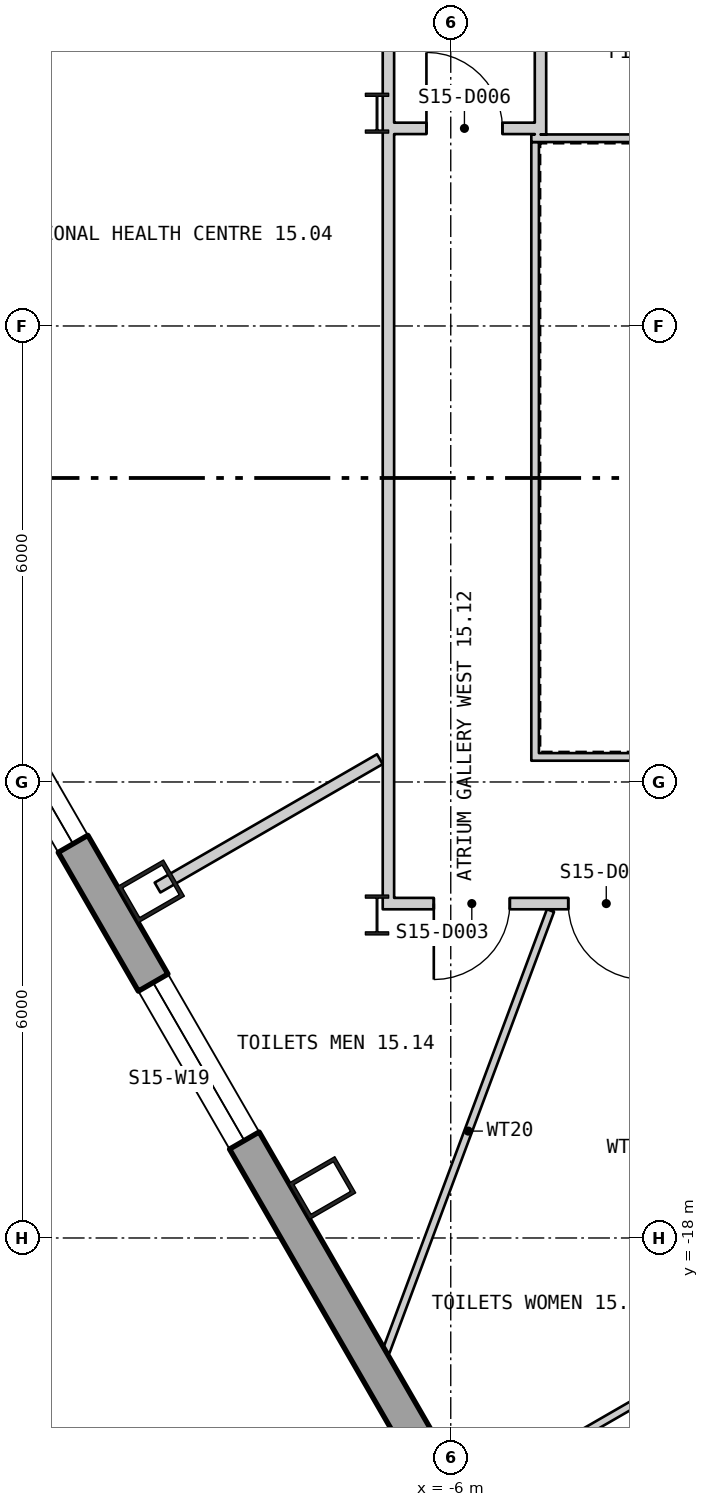
"""IFC4 building model, lengths in metres.
Left out: names, types, materials, properties, quantities, classifications, styles, units other than length and angle.
Written with IfcOpenShell. Run it as: python <this file> out.ifc"""

import sys

from ifc_helpers import new_model, si_unit, direction, frame, frame_2d, origin, origin_2d, place, context, subcontext, project, spatial, polyline, rectangle, hollow_rectangle, i_section, outline, extrude, element, fill, save


model = new_model("IFC4")
c1 = context("Model", 3, precision=1e-05, world=origin(), true_north=direction((0.0, 1.0)))
c2 = subcontext(c1, "Body", "Model", "MODEL_VIEW")
j1 = project(units=[si_unit("LENGTHUNIT", "METRE"), si_unit("PLANEANGLEUNIT", "RADIAN")], contexts=[c1])
p1 = place(None, origin())
s1 = spatial("IfcSite", under=j1, at=p1, CompositionType="ELEMENT")
p2 = place(p1, origin())
s2 = spatial("IfcBuilding", under=s1, at=p2, CompositionType="ELEMENT")
p3 = place(p2, frame((0.0, 0.0, 204.3)))
s3 = spatial("IfcBuildingStorey", under=s2, at=p3, CompositionType="ELEMENT", Elevation=204.3)
for number, where, z_axis, x_axis in (
    (1, (-9.945, -13.439, 0.0), (0.0, 0.0, 1.0), (0.5, -0.866, 0.0)),
    (2, (-7.691, -17.343, 0.0), (0.0, 0.0, 1.0), (0.5, -0.866, 0.0)),
):
    element("IfcColumn", number, at=place(p3, frame(where, z_axis=z_axis, x_axis=x_axis)), inside=s3, PredefinedType="COLUMN", context=c2, shape_type="SweptSolid", body=[
        extrude(hollow_rectangle(XDim=0.55, YDim=0.7, WallThickness=0.05, at=origin_2d()), origin(), (0.0, 0.0, 1.0), 3.9),
    ])
for number, where, z_axis, x_axis in (
    (3, (-6.97, -3.2, 0.0), (0.0, 0.0, 1.0), (1.0, 0.0, 0.0)),
    (4, (-6.97, -13.75, 0.0), (0.0, 0.0, 1.0), (1.0, 0.0, 0.0)),
):
    element("IfcColumn", number, at=place(p3, frame(where, z_axis=z_axis, x_axis=x_axis)), inside=s3, PredefinedType="COLUMN", context=c2, shape_type="SweptSolid", body=[
        extrude(i_section(OverallWidth=0.306, OverallDepth=0.524, WebThickness=0.021, FlangeThickness=0.04, at=origin_2d()), origin(), (0.0, 0.0, 1.0), 3.9),
    ])
p4 = place(p3, frame((-26.385, 13.887, -0.18), z_axis=(0.0, 0.0, 1.0), x_axis=(0.499999764979, -0.866025539474, 0.0)))
e5 = element("IfcWall", 5, at=p4, inside=s3, PredefinedType="SOLIDWALL", context=c2, shape_type="SweptSolid", body=[
    extrude(outline(polyline([(-0.13, -0.225), (45.87, -0.225), (45.61, 0.225), (0.13, 0.225), (-0.13, -0.225)])), origin(), (0.0, 0.0, 1.0), 3.68),
])
p5 = place(p4, frame((1.424, 0.0, 1.08)))
e6 = element("IfcOpeningElement", 6, at=p5, cuts=e5, PredefinedType="OPENING", context=c2, shape_type="SweptSolid", body=[
    extrude(rectangle(XDim=2.4, YDim=2.0, at=frame_2d((1.2, 1.0))), frame((0.0, 0.235, 0.0), z_axis=(0.0, -1.0, 0.0), x_axis=(1.0, 0.0, 0.0)), (0.0, 0.0, 1.0), 0.47),
])
p6 = place(p4, frame((5.893, 0.0, 1.08)))
e7 = element("IfcOpeningElement", 7, at=p6, cuts=e5, PredefinedType="OPENING", context=c2, shape_type="SweptSolid", body=[
    extrude(rectangle(XDim=2.4, YDim=2.0, at=frame_2d((1.2, 1.0))), frame((0.0, 0.235, 0.0), z_axis=(0.0, -1.0, 0.0), x_axis=(1.0, 0.0, 0.0)), (0.0, 0.0, 1.0), 0.47),
])
p7 = place(p4, frame((10.401, 0.0, 1.08)))
e8 = element("IfcOpeningElement", 8, at=p7, cuts=e5, PredefinedType="OPENING", context=c2, shape_type="SweptSolid", body=[
    extrude(rectangle(XDim=2.4, YDim=2.0, at=frame_2d((1.2, 1.0))), frame((0.0, 0.235, 0.0), z_axis=(0.0, -1.0, 0.0), x_axis=(1.0, 0.0, 0.0)), (0.0, 0.0, 1.0), 0.47),
])
p8 = place(p4, frame((14.909, 0.0, 1.08)))
e9 = element("IfcOpeningElement", 9, at=p8, cuts=e5, PredefinedType="OPENING", context=c2, shape_type="SweptSolid", body=[
    extrude(rectangle(XDim=2.4, YDim=2.0, at=frame_2d((1.2, 1.0))), frame((0.0, 0.235, 0.0), z_axis=(0.0, -1.0, 0.0), x_axis=(1.0, 0.0, 0.0)), (0.0, 0.0, 1.0), 0.47),
])
p9 = place(p4, frame((19.416, 0.0, 1.08)))
e10 = element("IfcOpeningElement", 10, at=p9, cuts=e5, PredefinedType="OPENING", context=c2, shape_type="SweptSolid", body=[
    extrude(rectangle(XDim=2.4, YDim=2.0, at=frame_2d((1.2, 1.0))), frame((0.0, 0.235, 0.0), z_axis=(0.0, -1.0, 0.0), x_axis=(1.0, 0.0, 0.0)), (0.0, 0.0, 1.0), 0.47),
])
p10 = place(p4, frame((23.924, 0.0, 1.08)))
e11 = element("IfcOpeningElement", 11, at=p10, cuts=e5, PredefinedType="OPENING", context=c2, shape_type="SweptSolid", body=[
    extrude(rectangle(XDim=2.4, YDim=2.0, at=frame_2d((1.2, 1.0))), frame((0.0, 0.235, 0.0), z_axis=(0.0, -1.0, 0.0), x_axis=(1.0, 0.0, 0.0)), (0.0, 0.0, 1.0), 0.47),
])
p11 = place(p4, frame((28.431, 0.0, 1.08)))
e12 = element("IfcOpeningElement", 12, at=p11, cuts=e5, PredefinedType="OPENING", context=c2, shape_type="SweptSolid", body=[
    extrude(rectangle(XDim=2.4, YDim=2.0, at=frame_2d((1.2, 1.0))), frame((0.0, 0.235, 0.0), z_axis=(0.0, -1.0, 0.0), x_axis=(1.0, 0.0, 0.0)), (0.0, 0.0, 1.0), 0.47),
])
p12 = place(p4, frame((32.939, 0.0, 1.08)))
e13 = element("IfcOpeningElement", 13, at=p12, cuts=e5, PredefinedType="OPENING", context=c2, shape_type="SweptSolid", body=[
    extrude(rectangle(XDim=2.4, YDim=2.0, at=frame_2d((1.2, 1.0))), frame((0.0, 0.235, 0.0), z_axis=(0.0, -1.0, 0.0), x_axis=(1.0, 0.0, 0.0)), (0.0, 0.0, 1.0), 0.47),
])
p13 = place(p4, frame((41.916, 0.0, 1.08)))
e14 = element("IfcOpeningElement", 14, at=p13, cuts=e5, PredefinedType="OPENING", context=c2, shape_type="SweptSolid", body=[
    extrude(rectangle(XDim=2.4, YDim=2.0, at=frame_2d((1.2, 1.0))), frame((0.0, 0.235, 0.0), z_axis=(0.0, -1.0, 0.0), x_axis=(1.0, 0.0, 0.0)), (0.0, 0.0, 1.0), 0.47),
])
for number, where, z_axis, x_axis in (
    (15, (-4.94, -11.67, 0.0), (0.0, 0.0, 1.0), (1.0, 0.0, 0.0)),
    (16, (4.94, -3.53, 0.0), (0.0, 0.0, 1.0), (-1.0, 0.0, 0.0)),
):
    element("IfcWall", number, at=place(p3, frame(where, z_axis=z_axis, x_axis=x_axis)), inside=s3, PredefinedType="PARTITIONING", context=c2, shape_type="SweptSolid", body=[
        extrude(rectangle(XDim=9.88, YDim=0.1, at=frame_2d((4.94, 0.0))), origin(), (0.0, 0.0, 1.0), 3.7),
    ])
p14 = place(p3, frame((-4.89, -3.58, 0.0), z_axis=(0.0, 0.0, 1.0), x_axis=(0.0, -1.0, 0.0)))
e17 = element("IfcWall", 17, at=p14, inside=s3, PredefinedType="PARTITIONING", context=c2, shape_type="SweptSolid", body=[
    extrude(rectangle(XDim=8.04, YDim=0.1, at=frame_2d((4.02, 0.0))), origin(), (0.0, 0.0, 1.0), 3.7),
])
p15 = place(p3, frame((-9.858, -13.389, 0.0), z_axis=(0.0, 0.0, 1.0), x_axis=(0.865993292597, 0.500055614084, 0.0)))
e18 = element("IfcWall", 18, at=p15, inside=s3, PredefinedType="PARTITIONING", context=c2, shape_type="SweptSolid", body=[
    extrude(rectangle(XDim=3.378, YDim=0.15, at=frame_2d((1.689, 0.0))), origin(), (0.0, 0.0, 1.0), 3.7),
])
p16 = place(p3, frame((-6.852, -19.495, 0.0), z_axis=(0.0, 0.0, 1.0), x_axis=(0.349406475185, 0.936971245609, 0.0)))
e19 = element("IfcWall", 19, at=p16, inside=s3, PredefinedType="PARTITIONING", context=c2, shape_type="SweptSolid", body=[
    extrude(rectangle(XDim=6.193, YDim=0.1, at=frame_2d((3.097, 0.0))), origin(), (0.0, 0.0, 1.0), 3.7),
])
p17 = place(p3, frame((-6.82, -13.675, 0.0), z_axis=(0.0, 0.0, 1.0), x_axis=(0.0, 1.0, 0.0)))
e20 = element("IfcWall", 20, at=p17, inside=s3, PredefinedType="PARTITIONING", context=c2, shape_type="SweptSolid", body=[
    extrude(rectangle(XDim=10.263, YDim=0.15, at=frame_2d((5.131, 0.0))), origin(), (0.0, 0.0, 1.0), 3.11),
])
p18 = place(p3, frame((-6.82, -3.412, 0.0), z_axis=(0.0, 0.0, 1.0), x_axis=(0.0, 1.0, 0.0)))
e21 = element("IfcWall", 21, at=p18, inside=s3, PredefinedType="PARTITIONING", context=c2, shape_type="SweptSolid", body=[
    extrude(rectangle(XDim=3.607, YDim=0.15, at=frame_2d((1.804, 0.0))), origin(), (0.0, 0.0, 1.0), 3.7),
])
p19 = place(p3, frame((-6.745, -13.6, 0.0), z_axis=(0.0, 0.0, 1.0), x_axis=(1.0, 0.0, 0.0)))
e22 = element("IfcWall", 22, at=p19, inside=s3, PredefinedType="PARTITIONING", context=c2, shape_type="SweptSolid", body=[
    extrude(rectangle(XDim=5.045, YDim=0.15, at=frame_2d((2.522, 0.0))), origin(), (0.0, 0.0, 1.0), 2.91),
])
p20 = place(p19, frame((0.522, 0.0, 0.0)))
e23 = element("IfcOpeningElement", 23, at=p20, cuts=e22, PredefinedType="OPENING", context=c2, shape_type="SweptSolid", body=[
    extrude(rectangle(XDim=1.0, YDim=2.1, at=frame_2d((0.5, 1.05))), frame((0.0, 0.085, 0.0), z_axis=(0.0, -1.0, 0.0), x_axis=(1.0, 0.0, 0.0)), (0.0, 0.0, 1.0), 0.17),
])
p21 = place(p19, frame((2.291, 0.0, 0.0)))
e24 = element("IfcOpeningElement", 24, at=p21, cuts=e22, PredefinedType="OPENING", context=c2, shape_type="SweptSolid", body=[
    extrude(rectangle(XDim=1.0, YDim=2.1, at=frame_2d((0.5, 1.05))), frame((0.0, 0.085, 0.0), z_axis=(0.0, -1.0, 0.0), x_axis=(1.0, 0.0, 0.0)), (0.0, 0.0, 1.0), 0.17),
])
p22 = place(p19, frame((3.866, 0.0, 0.0)))
e25 = element("IfcOpeningElement", 25, at=p22, cuts=e22, PredefinedType="OPENING", context=c2, shape_type="SweptSolid", body=[
    extrude(rectangle(XDim=0.9, YDim=2.1, at=frame_2d((0.45, 1.05))), frame((0.0, 0.085, 0.0), z_axis=(0.0, -1.0, 0.0), x_axis=(1.0, 0.0, 0.0)), (0.0, 0.0, 1.0), 0.17),
])
p23 = place(p3, frame((-6.745, -3.4, 0.0), z_axis=(0.0, 0.0, 1.0), x_axis=(1.0, 0.0, 0.0)))
e26 = element("IfcWall", 26, at=p23, inside=s3, PredefinedType="PARTITIONING", context=c2, shape_type="SweptSolid", body=[
    extrude(rectangle(XDim=1.851, YDim=0.15, at=frame_2d((0.925, 0.0))), origin(), (0.0, 0.0, 1.0), 3.7),
])
p24 = place(p23, frame((0.425, 0.0, 0.0)))
e27 = element("IfcOpeningElement", 27, at=p24, cuts=e26, PredefinedType="OPENING", context=c2, shape_type="SweptSolid", body=[
    extrude(rectangle(XDim=1.0, YDim=2.1, at=frame_2d((0.5, 1.05))), frame((0.0, 0.085, 0.0), z_axis=(0.0, -1.0, 0.0), x_axis=(1.0, 0.0, 0.0)), (0.0, 0.0, 1.0), 0.17),
])
p25 = place(p3, frame((-5.351, -21.196, 0.0), z_axis=(0.0, 0.0, 1.0), x_axis=(0.866290838041, 0.499539972301, 0.0)))
e28 = element("IfcWall", 28, at=p25, inside=s3, PredefinedType="PARTITIONING", context=c2, shape_type="SweptSolid", body=[
    extrude(rectangle(XDim=2.53, YDim=0.1, at=frame_2d((1.265, 0.0))), origin(), (0.0, 0.0, 1.0), 3.7),
])
p26 = place(p3, frame((-4.819, -3.48, 0.0), z_axis=(0.0, 0.0, 1.0), x_axis=(-0.000453514693, 0.999999897162, 0.0)))
e29 = element("IfcWall", 29, at=p26, inside=s3, PredefinedType="PARTITIONING", context=c2, shape_type="SweptSolid", body=[
    extrude(rectangle(XDim=2.205, YDim=0.15, at=frame_2d((1.103, 0.0))), origin(), (0.0, 0.0, 1.0), 3.7),
])
p27 = place(p11, origin())
e30 = element("IfcWindow", 30, at=p27, inside=s3, PartitioningType="SINGLE_PANEL", PredefinedType="WINDOW", context=c2, shape_type="SweptSolid", body=[
    extrude(rectangle(XDim=2.4, YDim=2.0, at=frame_2d((1.2, 1.0))), frame((0.0, 0.105, 0.0), z_axis=(0.0, -1.0, 0.0), x_axis=(1.0, 0.0, 0.0)), (0.0, 0.0, 1.0), 0.06),
])
fill(e12, e30)
p28 = place(p12, origin())
e31 = element("IfcWindow", 31, at=p28, inside=s3, PartitioningType="SINGLE_PANEL", PredefinedType="WINDOW", context=c2, shape_type="SweptSolid", body=[
    extrude(rectangle(XDim=2.4, YDim=2.0, at=frame_2d((1.2, 1.0))), frame((0.0, 0.105, 0.0), z_axis=(0.0, -1.0, 0.0), x_axis=(1.0, 0.0, 0.0)), (0.0, 0.0, 1.0), 0.06),
])
fill(e13, e31)
p29 = place(p20, origin())
e32 = element("IfcDoor", 32, at=p29, inside=s3, OperationType="SINGLE_SWING_LEFT", PredefinedType="DOOR", context=c2, shape_type="SweptSolid", body=[
    extrude(rectangle(XDim=1.0, YDim=2.1, at=frame_2d((0.5, 1.05))), frame((0.0, 0.025, 0.0), z_axis=(0.0, -1.0, 0.0), x_axis=(1.0, 0.0, 0.0)), (0.0, 0.0, 1.0), 0.05),
])
fill(e23, e32)
p30 = place(p21, origin())
e33 = element("IfcDoor", 33, at=p30, inside=s3, OperationType="SINGLE_SWING_RIGHT", PredefinedType="DOOR", context=c2, shape_type="SweptSolid", body=[
    extrude(rectangle(XDim=1.0, YDim=2.1, at=frame_2d((0.5, 1.05))), frame((0.0, 0.025, 0.0), z_axis=(0.0, -1.0, 0.0), x_axis=(1.0, 0.0, 0.0)), (0.0, 0.0, 1.0), 0.05),
])
fill(e24, e33)
p31 = place(p24, origin())
e34 = element("IfcDoor", 34, at=p31, inside=s3, OperationType="SINGLE_SWING_RIGHT", PredefinedType="DOOR", context=c2, shape_type="SweptSolid", body=[
    extrude(rectangle(XDim=1.0, YDim=2.1, at=frame_2d((0.5, 1.05))), frame((0.0, 0.025, 0.0), z_axis=(0.0, -1.0, 0.0), x_axis=(1.0, 0.0, 0.0)), (0.0, 0.0, 1.0), 0.05),
])
fill(e27, e34)
save(model, sys.argv[1])
